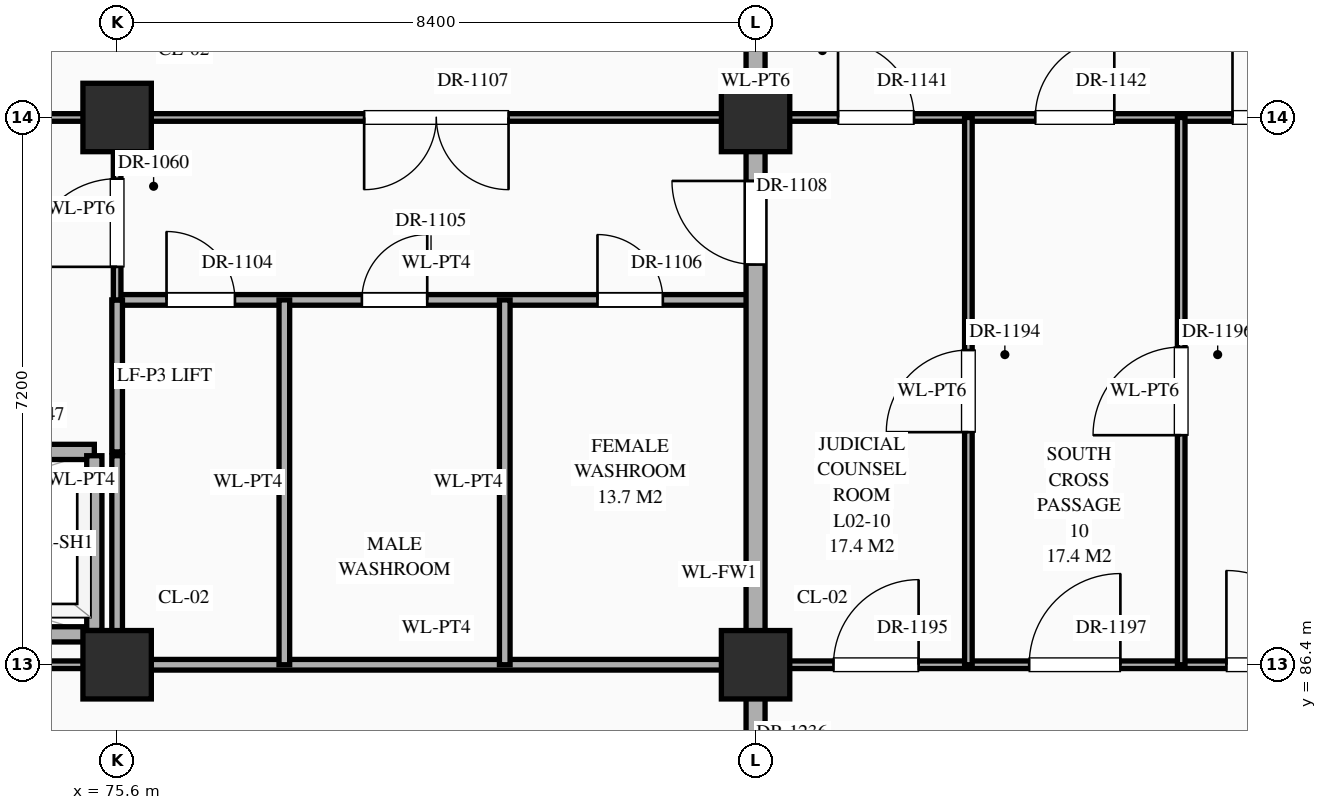
"""IFC4 building model, lengths in metres.
Left out: names, types, materials, properties, quantities, classifications, styles, units other than length and angle.
Written with IfcOpenShell. Run it as: python <this file> out.ifc"""

import sys

from ifc_helpers import new_model, si_unit, direction, frame, frame_2d, origin, origin_2d, place, context, subcontext, project, spatial, rectangle, extrude, element, fill, save


model = new_model("IFC4")
c1 = context("Model", 3, precision=1e-05, world=origin(), true_north=direction((0.0, 1.0)))
c2 = subcontext(c1, "Body", "Model", "MODEL_VIEW")
j1 = project(units=[si_unit("LENGTHUNIT", "METRE"), si_unit("PLANEANGLEUNIT", "RADIAN")], contexts=[c1])
p1 = place(None, origin())
s1 = spatial("IfcSite", under=j1, at=p1, CompositionType="ELEMENT")
p2 = place(p1, origin())
s2 = spatial("IfcBuilding", under=s1, at=p2, CompositionType="ELEMENT")
p3 = place(p2, frame((0.0, 0.0, 5.4)))
s3 = spatial("IfcBuildingStorey", under=s2, at=p3, CompositionType="ELEMENT", Elevation=5.4)
for number, where, z_axis, x_axis in (
    (1, (75.6, 86.4, 0.0), (0.0, 0.0, 1.0), (1.0, 0.0, 0.0)),
    (2, (75.6, 93.6, 0.0), (0.0, 0.0, 1.0), (1.0, 0.0, 0.0)),
    (3, (84.0, 86.4, 0.0), (0.0, 0.0, 1.0), (1.0, 0.0, 0.0)),
    (4, (84.0, 93.6, 0.0), (0.0, 0.0, 1.0), (1.0, 0.0, 0.0)),
):
    element("IfcColumn", number, at=place(p3, frame(where, z_axis=z_axis, x_axis=x_axis)), inside=s3, PredefinedType="COLUMN", context=c2, shape_type="SweptSolid", body=[
        extrude(rectangle(XDim=0.9, YDim=0.9, at=origin_2d()), origin(), (0.0, 0.0, 1.0), 5.4),
    ])
p4 = place(p3, frame((67.25, 86.4, 0.0), z_axis=(0.0, 0.0, 1.0), x_axis=(1.0, 0.0, 0.0)))
e5 = element("IfcWall", 5, at=p4, inside=s3, PredefinedType="STANDARD", context=c2, shape_type="SweptSolid", body=[
    extrude(rectangle(XDim=8.3, YDim=0.1, at=frame_2d((4.15, 0.0))), origin(), (0.0, 0.0, 1.0), 4.27),
])
p5 = place(p3, frame((75.6, 86.4, 0.0), z_axis=(0.0, 0.0, 1.0), x_axis=(1.0, 0.0, 0.0)))
e6 = element("IfcWall", 6, at=p5, inside=s3, PredefinedType="STANDARD", context=c2, shape_type="SweptSolid", body=[
    extrude(rectangle(XDim=8.4, YDim=0.14, at=frame_2d((4.2, 0.0))), origin(), (0.0, 0.0, 1.0), 4.27),
])
p6 = place(p3, frame((84.0, 86.4, 0.0), z_axis=(0.0, 0.0, 1.0), x_axis=(1.0, 0.0, 0.0)))
e7 = element("IfcWall", 7, at=p6, inside=s3, PredefinedType="STANDARD", context=c2, shape_type="SweptSolid", body=[
    extrude(rectangle(XDim=8.4, YDim=0.1, at=frame_2d((4.2, 0.0))), origin(), (0.0, 0.0, 1.0), 4.27),
])
p7 = place(p6, frame((1.025, 0.0, 0.0)))
e8 = element("IfcOpeningElement", 8, at=p7, cuts=e7, PredefinedType="OPENING", context=c2, shape_type="SweptSolid", body=[
    extrude(rectangle(XDim=1.12, YDim=2.25, at=frame_2d((0.56, 1.125))), frame((0.0, 0.062, 0.0), z_axis=(0.0, -1.0, 0.0), x_axis=(1.0, 0.0, 0.0)), (0.0, 0.0, 1.0), 0.124),
])
p8 = place(p6, frame((3.6, 0.0, 0.0)))
e9 = element("IfcOpeningElement", 9, at=p8, cuts=e7, PredefinedType="OPENING", context=c2, shape_type="SweptSolid", body=[
    extrude(rectangle(XDim=1.2, YDim=2.35, at=frame_2d((0.6, 1.175))), frame((0.0, 0.062, 0.0), z_axis=(0.0, -1.0, 0.0), x_axis=(1.0, 0.0, 0.0)), (0.0, 0.0, 1.0), 0.124),
])
p9 = place(p6, frame((6.195, 0.0, 0.0)))
e10 = element("IfcOpeningElement", 10, at=p9, cuts=e7, PredefinedType="OPENING", context=c2, shape_type="SweptSolid", body=[
    extrude(rectangle(XDim=1.24, YDim=2.3, at=frame_2d((0.62, 1.15))), frame((0.0, 0.062, 0.0), z_axis=(0.0, -1.0, 0.0), x_axis=(1.0, 0.0, 0.0)), (0.0, 0.0, 1.0), 0.124),
])
p10 = place(p3, frame((72.8, 86.8, 0.0), z_axis=(0.0, 0.0, 1.0), x_axis=(1.0, 0.0, 0.0)))
e11 = element("IfcWall", 11, at=p10, inside=s3, PredefinedType="STANDARD", context=c2, shape_type="SweptSolid", body=[
    extrude(rectangle(XDim=2.5, YDim=0.2, at=frame_2d((1.25, 0.0))), origin(), (0.0, 0.0, 1.0), 5.12),
])
p11 = place(p3, frame((67.6, 89.2, 0.0), z_axis=(0.0, 0.0, 1.0), x_axis=(1.0, 0.0, 0.0)))
e12 = element("IfcWall", 12, at=p11, inside=s3, PredefinedType="STANDARD", context=c2, shape_type="SweptSolid", body=[
    extrude(rectangle(XDim=7.7, YDim=0.2, at=frame_2d((3.85, 0.0))), origin(), (0.0, 0.0, 1.0), 5.12),
])
p12 = place(p11, frame((0.725, 0.0, 0.0)))
e13 = element("IfcOpeningElement", 13, at=p12, cuts=e12, PredefinedType="OPENING", context=c2, shape_type="SweptSolid", body=[
    extrude(rectangle(XDim=1.1, YDim=2.15, at=frame_2d((0.55, 1.075))), frame((0.0, 0.112, 0.0), z_axis=(0.0, -1.0, 0.0), x_axis=(1.0, 0.0, 0.0)), (0.0, 0.0, 1.0), 0.224),
])
p13 = place(p11, frame((3.3, 0.0, 0.0)))
e14 = element("IfcOpeningElement", 14, at=p13, cuts=e12, PredefinedType="OPENING", context=c2, shape_type="SweptSolid", body=[
    extrude(rectangle(XDim=1.1, YDim=2.15, at=frame_2d((0.55, 1.075))), frame((0.0, 0.112, 0.0), z_axis=(0.0, -1.0, 0.0), x_axis=(1.0, 0.0, 0.0)), (0.0, 0.0, 1.0), 0.224),
])
p14 = place(p11, frame((5.875, 0.0, 0.0)))
e15 = element("IfcOpeningElement", 15, at=p14, cuts=e12, PredefinedType="OPENING", context=c2, shape_type="SweptSolid", body=[
    extrude(rectangle(XDim=1.1, YDim=2.15, at=frame_2d((0.55, 1.075))), frame((0.0, 0.112, 0.0), z_axis=(0.0, -1.0, 0.0), x_axis=(1.0, 0.0, 0.0)), (0.0, 0.0, 1.0), 0.224),
])
p15 = place(p3, frame((75.6, 91.2, 0.0), z_axis=(0.0, 0.0, 1.0), x_axis=(1.0, 0.0, 0.0)))
e16 = element("IfcWall", 16, at=p15, inside=s3, PredefinedType="STANDARD", context=c2, shape_type="SweptSolid", body=[
    extrude(rectangle(XDim=8.4, YDim=0.14, at=frame_2d((4.2, 0.0))), origin(), (0.0, 0.0, 1.0), 5.12),
])
p16 = place(p15, frame((0.65, 0.0, 0.0)))
e17 = element("IfcOpeningElement", 17, at=p16, cuts=e16, PredefinedType="OPENING", context=c2, shape_type="SweptSolid", body=[
    extrude(rectangle(XDim=0.9, YDim=2.15, at=frame_2d((0.45, 1.075))), frame((0.0, 0.082, 0.0), z_axis=(0.0, -1.0, 0.0), x_axis=(1.0, 0.0, 0.0)), (0.0, 0.0, 1.0), 0.164),
])
p17 = place(p15, frame((3.22, 0.0, 0.0)))
e18 = element("IfcOpeningElement", 18, at=p17, cuts=e16, PredefinedType="OPENING", context=c2, shape_type="SweptSolid", body=[
    extrude(rectangle(XDim=0.86, YDim=2.1, at=frame_2d((0.43, 1.05))), frame((0.0, 0.082, 0.0), z_axis=(0.0, -1.0, 0.0), x_axis=(1.0, 0.0, 0.0)), (0.0, 0.0, 1.0), 0.164),
])
p18 = place(p15, frame((6.32, 0.0, 0.0)))
e19 = element("IfcOpeningElement", 19, at=p18, cuts=e16, PredefinedType="OPENING", context=c2, shape_type="SweptSolid", body=[
    extrude(rectangle(XDim=0.86, YDim=2.1, at=frame_2d((0.43, 1.05))), frame((0.0, 0.082, 0.0), z_axis=(0.0, -1.0, 0.0), x_axis=(1.0, 0.0, 0.0)), (0.0, 0.0, 1.0), 0.164),
])
p19 = place(p3, frame((67.2, 93.6, 0.0), z_axis=(0.0, 0.0, 1.0), x_axis=(1.0, 0.0, 0.0)))
e20 = element("IfcWall", 20, at=p19, inside=s3, PredefinedType="STANDARD", context=c2, shape_type="SweptSolid", body=[
    extrude(rectangle(XDim=33.6, YDim=0.1, at=frame_2d((16.8, 0.0))), origin(), (0.0, 0.0, 1.0), 4.27),
])
p20 = place(p19, frame((3.375, 0.0, 0.0)))
e21 = element("IfcOpeningElement", 21, at=p20, cuts=e20, PredefinedType="OPENING", context=c2, shape_type="SweptSolid", body=[
    extrude(rectangle(XDim=1.65, YDim=2.4, at=frame_2d((0.825, 1.2))), frame((0.0, 0.062, 0.0), z_axis=(0.0, -1.0, 0.0), x_axis=(1.0, 0.0, 0.0)), (0.0, 0.0, 1.0), 0.124),
])
p21 = place(p19, frame((28.625, 0.0, 0.0)))
e22 = element("IfcOpeningElement", 22, at=p21, cuts=e20, PredefinedType="OPENING", context=c2, shape_type="SweptSolid", body=[
    extrude(rectangle(XDim=1.55, YDim=2.35, at=frame_2d((0.775, 1.175))), frame((0.0, 0.062, 0.0), z_axis=(0.0, -1.0, 0.0), x_axis=(1.0, 0.0, 0.0)), (0.0, 0.0, 1.0), 0.124),
])
p22 = place(p19, frame((11.65, 0.0, 0.0)))
e23 = element("IfcOpeningElement", 23, at=p22, cuts=e20, PredefinedType="OPENING", context=c2, shape_type="SweptSolid", body=[
    extrude(rectangle(XDim=1.9, YDim=2.5, at=frame_2d((0.95, 1.25))), frame((0.0, 0.062, 0.0), z_axis=(0.0, -1.0, 0.0), x_axis=(1.0, 0.0, 0.0)), (0.0, 0.0, 1.0), 0.124),
])
p23 = place(p19, frame((17.885, 0.0, 0.0)))
e24 = element("IfcOpeningElement", 24, at=p23, cuts=e20, PredefinedType="OPENING", context=c2, shape_type="SweptSolid", body=[
    extrude(rectangle(XDim=1.0, YDim=2.25, at=frame_2d((0.5, 1.125))), frame((0.0, 0.062, 0.0), z_axis=(0.0, -1.0, 0.0), x_axis=(1.0, 0.0, 0.0)), (0.0, 0.0, 1.0), 0.124),
])
p24 = place(p19, frame((20.48, 0.0, 0.0)))
e25 = element("IfcOpeningElement", 25, at=p24, cuts=e20, PredefinedType="OPENING", context=c2, shape_type="SweptSolid", body=[
    extrude(rectangle(XDim=1.04, YDim=2.2, at=frame_2d((0.52, 1.1))), frame((0.0, 0.062, 0.0), z_axis=(0.0, -1.0, 0.0), x_axis=(1.0, 0.0, 0.0)), (0.0, 0.0, 1.0), 0.124),
])
p25 = place(p19, frame((23.075, 0.0, 0.0)))
e26 = element("IfcOpeningElement", 26, at=p25, cuts=e20, PredefinedType="OPENING", context=c2, shape_type="SweptSolid", body=[
    extrude(rectangle(XDim=1.08, YDim=2.25, at=frame_2d((0.54, 1.125))), frame((0.0, 0.062, 0.0), z_axis=(0.0, -1.0, 0.0), x_axis=(1.0, 0.0, 0.0)), (0.0, 0.0, 1.0), 0.124),
])
p26 = place(p3, frame((75.3, 86.85, 0.0), z_axis=(0.0, 0.0, 1.0), x_axis=(0.0, 1.0, 0.0)))
e27 = element("IfcWall", 27, at=p26, inside=s3, PredefinedType="STANDARD", context=c2, shape_type="SweptSolid", body=[
    extrude(rectangle(XDim=2.3, YDim=0.2, at=frame_2d((1.15, 0.0))), origin(), (0.0, 0.0, 1.0), 5.12),
])
p27 = place(p3, frame((75.6, 86.45, 0.0), z_axis=(0.0, 0.0, 1.0), x_axis=(0.0, 1.0, 0.0)))
e28 = element("IfcWall", 28, at=p27, inside=s3, PredefinedType="STANDARD", context=c2, shape_type="SweptSolid", body=[
    extrude(rectangle(XDim=2.7, YDim=0.14, at=frame_2d((1.35, 0.0))), origin(), (0.0, 0.0, 1.0), 4.37),
])
p28 = place(p3, frame((75.6, 89.2, 0.0), z_axis=(0.0, 0.0, 1.0), x_axis=(0.0, 1.0, 0.0)))
e29 = element("IfcWall", 29, at=p28, inside=s3, PredefinedType="STANDARD", context=c2, shape_type="SweptSolid", body=[
    extrude(rectangle(XDim=2.0, YDim=0.14, at=frame_2d((1.0, 0.0))), origin(), (0.0, 0.0, 1.0), 4.37),
])
p29 = place(p3, frame((75.6, 91.2, 0.0), z_axis=(0.0, 0.0, 1.0), x_axis=(0.0, 1.0, 0.0)))
e30 = element("IfcWall", 30, at=p29, inside=s3, PredefinedType="STANDARD", context=c2, shape_type="SweptSolid", body=[
    extrude(rectangle(XDim=2.4, YDim=0.1, at=frame_2d((1.2, 0.0))), origin(), (0.0, 0.0, 1.0), 4.37),
])
p30 = place(p29, frame((0.435, 0.0, 0.0)))
e31 = element("IfcOpeningElement", 31, at=p30, cuts=e30, PredefinedType="OPENING", context=c2, shape_type="SweptSolid", body=[
    extrude(rectangle(XDim=1.16, YDim=2.3, at=frame_2d((0.58, 1.15))), frame((0.0, 0.062, 0.0), z_axis=(0.0, -1.0, 0.0), x_axis=(1.0, 0.0, 0.0)), (0.0, 0.0, 1.0), 0.124),
])
for number, where, z_axis, x_axis in (
    (32, (77.8, 86.4, 0.0), (0.0, 0.0, 1.0), (0.0, 1.0, 0.0)),
    (33, (80.7, 86.4, 0.0), (0.0, 0.0, 1.0), (0.0, 1.0, 0.0)),
):
    element("IfcWall", number, at=place(p3, frame(where, z_axis=z_axis, x_axis=x_axis)), inside=s3, PredefinedType="STANDARD", context=c2, shape_type="SweptSolid", body=[
        extrude(rectangle(XDim=4.8, YDim=0.14, at=frame_2d((2.4, 0.0))), origin(), (0.0, 0.0, 1.0), 5.12),
    ])
p31 = place(p3, frame((84.0, 79.2, 0.0), z_axis=(0.0, 0.0, 1.0), x_axis=(0.0, 1.0, 0.0)))
e34 = element("IfcWall", 34, at=p31, inside=s3, PredefinedType="STANDARD", context=c2, shape_type="SweptSolid", body=[
    extrude(rectangle(XDim=16.8, YDim=0.25, at=frame_2d((8.4, 0.0))), origin(), (0.0, 0.0, 1.0), 4.37),
])
p32 = place(p31, frame((12.465, 0.0, 0.0)))
e35 = element("IfcOpeningElement", 35, at=p32, cuts=e34, PredefinedType="OPENING", context=c2, shape_type="SweptSolid", body=[
    extrude(rectangle(XDim=1.1, YDim=2.2, at=frame_2d((0.55, 1.1))), frame((0.0, 0.137, 0.0), z_axis=(0.0, -1.0, 0.0), x_axis=(1.0, 0.0, 0.0)), (0.0, 0.0, 1.0), 0.274),
])
p33 = place(p31, frame((15.31, 0.0, 0.0)))
e36 = element("IfcOpeningElement", 36, at=p33, cuts=e34, PredefinedType="OPENING", context=c2, shape_type="SweptSolid", body=[
    extrude(rectangle(XDim=0.95, YDim=2.15, at=frame_2d((0.475, 1.075))), frame((0.0, 0.137, 0.0), z_axis=(0.0, -1.0, 0.0), x_axis=(1.0, 0.0, 0.0)), (0.0, 0.0, 1.0), 0.274),
])
p34 = place(p31, frame((5.34, 0.0, 0.0)))
e37 = element("IfcOpeningElement", 37, at=p34, cuts=e34, PredefinedType="OPENING", context=c2, shape_type="SweptSolid", body=[
    extrude(rectangle(XDim=0.95, YDim=2.15, at=frame_2d((0.475, 1.075))), frame((0.0, 0.137, 0.0), z_axis=(0.0, -1.0, 0.0), x_axis=(1.0, 0.0, 0.0)), (0.0, 0.0, 1.0), 0.274),
])
p35 = place(p3, frame((86.8, 86.4, 0.0), z_axis=(0.0, 0.0, 1.0), x_axis=(0.0, 1.0, 0.0)))
e38 = element("IfcWall", 38, at=p35, inside=s3, PredefinedType="STANDARD", context=c2, shape_type="SweptSolid", body=[
    extrude(rectangle(XDim=7.2, YDim=0.1, at=frame_2d((3.6, 0.0))), origin(), (0.0, 0.0, 1.0), 5.12),
])
p36 = place(p35, frame((3.06, 0.0, 0.0)))
e39 = element("IfcOpeningElement", 39, at=p36, cuts=e38, PredefinedType="OPENING", context=c2, shape_type="SweptSolid", body=[
    extrude(rectangle(XDim=1.08, YDim=2.25, at=frame_2d((0.54, 1.125))), frame((0.0, 0.062, 0.0), z_axis=(0.0, -1.0, 0.0), x_axis=(1.0, 0.0, 0.0)), (0.0, 0.0, 1.0), 0.124),
])
p37 = place(p3, frame((89.6, 86.4, 0.0), z_axis=(0.0, 0.0, 1.0), x_axis=(0.0, 1.0, 0.0)))
e40 = element("IfcWall", 40, at=p37, inside=s3, PredefinedType="STANDARD", context=c2, shape_type="SweptSolid", body=[
    extrude(rectangle(XDim=7.2, YDim=0.1, at=frame_2d((3.6, 0.0))), origin(), (0.0, 0.0, 1.0), 5.12),
])
p38 = place(p37, frame((3.02, 0.0, 0.0)))
e41 = element("IfcOpeningElement", 41, at=p38, cuts=e40, PredefinedType="OPENING", context=c2, shape_type="SweptSolid", body=[
    extrude(rectangle(XDim=1.16, YDim=2.3, at=frame_2d((0.58, 1.15))), frame((0.0, 0.062, 0.0), z_axis=(0.0, -1.0, 0.0), x_axis=(1.0, 0.0, 0.0)), (0.0, 0.0, 1.0), 0.124),
])
p39 = place(p30, origin())
e42 = element("IfcDoor", 42, at=p39, inside=s3, OperationType="SINGLE_SWING_LEFT", PredefinedType="DOOR", context=c2, shape_type="SweptSolid", body=[
    extrude(rectangle(XDim=1.16, YDim=2.3, at=frame_2d((0.58, 1.15))), frame((0.0, 0.025, 0.0), z_axis=(0.0, -1.0, 0.0), x_axis=(1.0, 0.0, 0.0)), (0.0, 0.0, 1.0), 0.05),
])
fill(e31, e42)
p40 = place(p16, origin())
e43 = element("IfcDoor", 43, at=p40, inside=s3, OperationType="SINGLE_SWING_LEFT", PredefinedType="DOOR", context=c2, shape_type="SweptSolid", body=[
    extrude(rectangle(XDim=0.9, YDim=2.15, at=frame_2d((0.45, 1.075))), frame((0.0, 0.025, 0.0), z_axis=(0.0, -1.0, 0.0), x_axis=(1.0, 0.0, 0.0)), (0.0, 0.0, 1.0), 0.05),
])
fill(e17, e43)
p41 = place(p17, origin())
e44 = element("IfcDoor", 44, at=p41, inside=s3, OperationType="SINGLE_SWING_RIGHT", PredefinedType="DOOR", context=c2, shape_type="SweptSolid", body=[
    extrude(rectangle(XDim=0.86, YDim=2.1, at=frame_2d((0.43, 1.05))), frame((0.0, 0.025, 0.0), z_axis=(0.0, -1.0, 0.0), x_axis=(1.0, 0.0, 0.0)), (0.0, 0.0, 1.0), 0.05),
])
fill(e18, e44)
p42 = place(p18, origin())
e45 = element("IfcDoor", 45, at=p42, inside=s3, OperationType="SINGLE_SWING_LEFT", PredefinedType="DOOR", context=c2, shape_type="SweptSolid", body=[
    extrude(rectangle(XDim=0.86, YDim=2.1, at=frame_2d((0.43, 1.05))), frame((0.0, 0.025, 0.0), z_axis=(0.0, -1.0, 0.0), x_axis=(1.0, 0.0, 0.0)), (0.0, 0.0, 1.0), 0.05),
])
fill(e19, e45)
p43 = place(p22, frame((1.9, 0.0, 0.0), z_axis=(0.0, 0.0, 1.0), x_axis=(-1.0, 0.0, 0.0)))
e46 = element("IfcDoor", 46, at=p43, inside=s3, OperationType="DOUBLE_DOOR_SINGLE_SWING", PredefinedType="DOOR", context=c2, shape_type="SweptSolid", body=[
    extrude(rectangle(XDim=1.9, YDim=2.5, at=frame_2d((0.95, 1.25))), frame((0.0, 0.025, 0.0), z_axis=(0.0, -1.0, 0.0), x_axis=(1.0, 0.0, 0.0)), (0.0, 0.0, 1.0), 0.05),
])
fill(e23, e46)
p44 = place(p32, origin())
e47 = element("IfcDoor", 47, at=p44, inside=s3, OperationType="SINGLE_SWING_RIGHT", PredefinedType="DOOR", context=c2, shape_type="SweptSolid", body=[
    extrude(rectangle(XDim=1.1, YDim=2.2, at=frame_2d((0.55, 1.1))), frame((0.0, 0.025, 0.0), z_axis=(0.0, -1.0, 0.0), x_axis=(1.0, 0.0, 0.0)), (0.0, 0.0, 1.0), 0.05),
])
fill(e35, e47)
p45 = place(p23, origin())
e48 = element("IfcDoor", 48, at=p45, inside=s3, OperationType="SINGLE_SWING_LEFT", PredefinedType="DOOR", context=c2, shape_type="SweptSolid", body=[
    extrude(rectangle(XDim=1.0, YDim=2.25, at=frame_2d((0.5, 1.125))), frame((0.0, 0.025, 0.0), z_axis=(0.0, -1.0, 0.0), x_axis=(1.0, 0.0, 0.0)), (0.0, 0.0, 1.0), 0.05),
])
fill(e24, e48)
p46 = place(p24, origin())
e49 = element("IfcDoor", 49, at=p46, inside=s3, OperationType="SINGLE_SWING_RIGHT", PredefinedType="DOOR", context=c2, shape_type="SweptSolid", body=[
    extrude(rectangle(XDim=1.04, YDim=2.2, at=frame_2d((0.52, 1.1))), frame((0.0, 0.025, 0.0), z_axis=(0.0, -1.0, 0.0), x_axis=(1.0, 0.0, 0.0)), (0.0, 0.0, 1.0), 0.05),
])
fill(e25, e49)
p47 = place(p25, origin())
e50 = element("IfcDoor", 50, at=p47, inside=s3, OperationType="SINGLE_SWING_LEFT", PredefinedType="DOOR", context=c2, shape_type="SweptSolid", body=[
    extrude(rectangle(XDim=1.08, YDim=2.25, at=frame_2d((0.54, 1.125))), frame((0.0, 0.025, 0.0), z_axis=(0.0, -1.0, 0.0), x_axis=(1.0, 0.0, 0.0)), (0.0, 0.0, 1.0), 0.05),
])
fill(e26, e50)
p48 = place(p36, origin())
e51 = element("IfcDoor", 51, at=p48, inside=s3, OperationType="SINGLE_SWING_LEFT", PredefinedType="DOOR", context=c2, shape_type="SweptSolid", body=[
    extrude(rectangle(XDim=1.08, YDim=2.25, at=frame_2d((0.54, 1.125))), frame((0.0, 0.025, 0.0), z_axis=(0.0, -1.0, 0.0), x_axis=(1.0, 0.0, 0.0)), (0.0, 0.0, 1.0), 0.05),
])
fill(e39, e51)
p49 = place(p7, origin())
e52 = element("IfcDoor", 52, at=p49, inside=s3, OperationType="SINGLE_SWING_RIGHT", PredefinedType="DOOR", context=c2, shape_type="SweptSolid", body=[
    extrude(rectangle(XDim=1.12, YDim=2.25, at=frame_2d((0.56, 1.125))), frame((0.0, 0.025, 0.0), z_axis=(0.0, -1.0, 0.0), x_axis=(1.0, 0.0, 0.0)), (0.0, 0.0, 1.0), 0.05),
])
fill(e8, e52)
p50 = place(p38, origin())
e53 = element("IfcDoor", 53, at=p50, inside=s3, OperationType="SINGLE_SWING_LEFT", PredefinedType="DOOR", context=c2, shape_type="SweptSolid", body=[
    extrude(rectangle(XDim=1.16, YDim=2.3, at=frame_2d((0.58, 1.15))), frame((0.0, 0.025, 0.0), z_axis=(0.0, -1.0, 0.0), x_axis=(1.0, 0.0, 0.0)), (0.0, 0.0, 1.0), 0.05),
])
fill(e41, e53)
p51 = place(p8, origin())
e54 = element("IfcDoor", 54, at=p51, inside=s3, OperationType="SINGLE_SWING_RIGHT", PredefinedType="DOOR", context=c2, shape_type="SweptSolid", body=[
    extrude(rectangle(XDim=1.2, YDim=2.35, at=frame_2d((0.6, 1.175))), frame((0.0, 0.025, 0.0), z_axis=(0.0, -1.0, 0.0), x_axis=(1.0, 0.0, 0.0)), (0.0, 0.0, 1.0), 0.05),
])
fill(e9, e54)
p52 = place(p9, origin())
e55 = element("IfcDoor", 55, at=p52, inside=s3, OperationType="SINGLE_SWING_LEFT", PredefinedType="DOOR", context=c2, shape_type="SweptSolid", body=[
    extrude(rectangle(XDim=1.24, YDim=2.3, at=frame_2d((0.62, 1.15))), frame((0.0, 0.025, 0.0), z_axis=(0.0, -1.0, 0.0), x_axis=(1.0, 0.0, 0.0)), (0.0, 0.0, 1.0), 0.05),
])
fill(e10, e55)
save(model, sys.argv[1])
